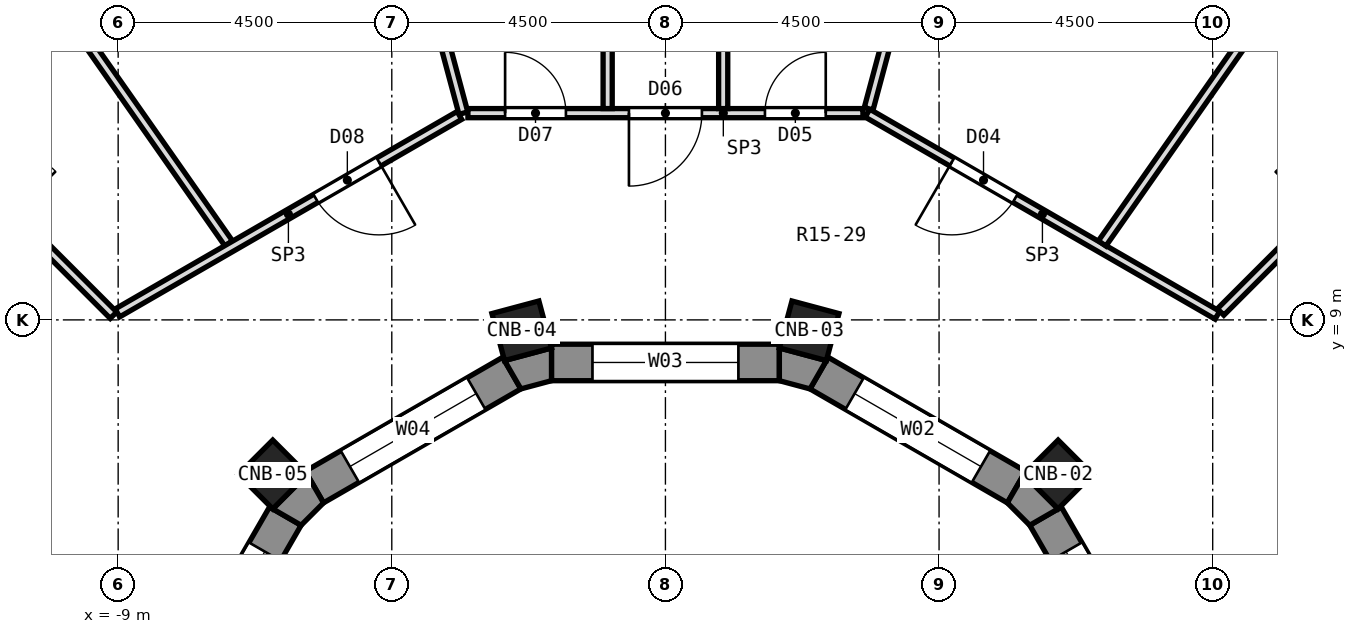
"""IFC4 building model, lengths in metres.
Left out: names, types, materials, properties, quantities, classifications, styles, units other than length and angle.
Written with IfcOpenShell. Run it as: python <this file> out.ifc"""

import sys

from ifc_helpers import new_model, si_unit, direction, frame, frame_2d, origin, origin_2d, place, context, subcontext, project, spatial, polyline, rectangle, outline, extrude, element, fill, save


model = new_model("IFC4")
c1 = context("Model", 3, precision=1e-05, world=origin(), true_north=direction((0.0, 1.0)))
c2 = subcontext(c1, "Body", "Model", "MODEL_VIEW")
j1 = project(units=[si_unit("LENGTHUNIT", "METRE"), si_unit("PLANEANGLEUNIT", "RADIAN")], contexts=[c1])
p1 = place(None, origin())
s1 = spatial("IfcSite", under=j1, at=p1, CompositionType="ELEMENT")
p2 = place(p1, origin())
s2 = spatial("IfcBuilding", under=s1, at=p2, CompositionType="ELEMENT")
p3 = place(p2, frame((0.0, 0.0, 82.4)))
s3 = spatial("IfcBuildingStorey", under=s2, at=p3, CompositionType="ELEMENT", Elevation=82.4)
for number, where, z_axis, x_axis in (
    (1, (6.458, 6.458, 0.0), (0.0, 0.0, 1.0), (0.707, 0.707, 0.0)),
    (2, (2.364, 8.821, 0.0), (0.0, 0.0, 1.0), (0.259, 0.966, 0.0)),
    (3, (-2.364, 8.821, 0.0), (0.0, 0.0, 1.0), (-0.259, 0.966, 0.0)),
    (4, (-6.458, 6.458, 0.0), (0.0, 0.0, 1.0), (-0.707, 0.707, 0.0)),
):
    element("IfcColumn", number, at=place(p3, frame(where, z_axis=z_axis, x_axis=x_axis)), inside=s3, PredefinedType="COLUMN", context=c2, shape_type="SweptSolid", body=[
        extrude(rectangle(XDim=0.8, YDim=0.8, at=origin_2d()), origin(), (0.0, 0.0, 1.0), 4.5),
    ])
p4 = place(p3, frame((8.125, 2.527, 0.0), z_axis=(0.0, 0.0, 1.0), x_axis=(-0.499964958637, 0.86604563398, 0.0)))
e5 = element("IfcWall", 5, at=p4, inside=s3, PredefinedType="SOLIDWALL", context=c2, shape_type="SweptSolid", body=[
    extrude(rectangle(XDim=3.747, YDim=0.6, at=frame_2d((1.874, 0.0))), origin(), (0.0, 0.0, 1.0), 3.95),
])
p5 = place(p4, frame((0.674, 0.0, 1.5)))
e6 = element("IfcOpeningElement", 6, at=p5, cuts=e5, PredefinedType="OPENING", context=c2, shape_type="SweptSolid", body=[
    extrude(rectangle(XDim=2.4, YDim=2.0, at=frame_2d((1.2, 1.0))), frame((0.0, 0.312, 0.0), z_axis=(0.0, -1.0, 0.0), x_axis=(1.0, 0.0, 0.0)), (0.0, 0.0, 1.0), 0.624),
])
p6 = place(p3, frame((5.773, 6.251, 0.0), z_axis=(0.0, 0.0, 1.0), x_axis=(-0.86604563398, 0.499964958637, 0.0)))
e7 = element("IfcWall", 7, at=p6, inside=s3, PredefinedType="SOLIDWALL", context=c2, shape_type="SweptSolid", body=[
    extrude(rectangle(XDim=3.747, YDim=0.6, at=frame_2d((1.874, 0.0))), origin(), (0.0, 0.0, 1.0), 3.95),
])
p7 = place(p6, frame((0.674, 0.0, 1.5)))
e8 = element("IfcOpeningElement", 8, at=p7, cuts=e7, PredefinedType="OPENING", context=c2, shape_type="SweptSolid", body=[
    extrude(rectangle(XDim=2.4, YDim=2.0, at=frame_2d((1.2, 1.0))), frame((0.0, 0.312, 0.0), z_axis=(0.0, -1.0, 0.0), x_axis=(1.0, 0.0, 0.0)), (0.0, 0.0, 1.0), 0.624),
])
p8 = place(p3, frame((1.874, 8.3, 0.0), z_axis=(0.0, 0.0, 1.0), x_axis=(-1.0, 0.0, 0.0)))
e9 = element("IfcWall", 9, at=p8, inside=s3, PredefinedType="SOLIDWALL", context=c2, shape_type="SweptSolid", body=[
    extrude(rectangle(XDim=3.748, YDim=0.6, at=frame_2d((1.874, 0.0))), origin(), (0.0, 0.0, 1.0), 3.95),
])
p9 = place(p8, frame((0.674, 0.0, 1.5)))
e10 = element("IfcOpeningElement", 10, at=p9, cuts=e9, PredefinedType="OPENING", context=c2, shape_type="SweptSolid", body=[
    extrude(rectangle(XDim=2.4, YDim=2.0, at=frame_2d((1.2, 1.0))), frame((0.0, 0.312, 0.0), z_axis=(0.0, -1.0, 0.0), x_axis=(1.0, 0.0, 0.0)), (0.0, 0.0, 1.0), 0.624),
])
p10 = place(p3, frame((-2.527, 8.125, 0.0), z_axis=(0.0, 0.0, 1.0), x_axis=(-0.86604563398, -0.499964958637, 0.0)))
e11 = element("IfcWall", 11, at=p10, inside=s3, PredefinedType="SOLIDWALL", context=c2, shape_type="SweptSolid", body=[
    extrude(rectangle(XDim=3.747, YDim=0.6, at=frame_2d((1.874, 0.0))), origin(), (0.0, 0.0, 1.0), 3.95),
])
p11 = place(p10, frame((0.674, 0.0, 1.5)))
e12 = element("IfcOpeningElement", 12, at=p11, cuts=e11, PredefinedType="OPENING", context=c2, shape_type="SweptSolid", body=[
    extrude(rectangle(XDim=2.4, YDim=2.0, at=frame_2d((1.2, 1.0))), frame((0.0, 0.312, 0.0), z_axis=(0.0, -1.0, 0.0), x_axis=(1.0, 0.0, 0.0)), (0.0, 0.0, 1.0), 0.624),
])
p12 = place(p3, frame((-6.251, 5.773, 0.0), z_axis=(0.0, 0.0, 1.0), x_axis=(-0.499964958637, -0.86604563398, 0.0)))
e13 = element("IfcWall", 13, at=p12, inside=s3, PredefinedType="SOLIDWALL", context=c2, shape_type="SweptSolid", body=[
    extrude(rectangle(XDim=3.747, YDim=0.6, at=frame_2d((1.874, 0.0))), origin(), (0.0, 0.0, 1.0), 3.95),
])
p13 = place(p12, frame((0.674, 0.0, 1.5)))
e14 = element("IfcOpeningElement", 14, at=p13, cuts=e13, PredefinedType="OPENING", context=c2, shape_type="SweptSolid", body=[
    extrude(rectangle(XDim=2.4, YDim=2.0, at=frame_2d((1.2, 1.0))), frame((0.0, 0.312, 0.0), z_axis=(0.0, -1.0, 0.0), x_axis=(1.0, 0.0, 0.0)), (0.0, 0.0, 1.0), 0.624),
])
p14 = place(p3, origin())
e15 = element("IfcWall", 15, at=p14, inside=s3, PredefinedType="SOLIDWALL", context=c2, shape_type="SweptSolid", body=[
    extrude(outline(polyline([(5.892, 6.458), (5.623, 5.991), (5.991, 5.623), (6.458, 5.892), (5.892, 6.458)])), origin(), (0.0, 0.0, 1.0), 3.95),
])
p15 = place(p3, origin())
e16 = element("IfcWall", 16, at=p15, inside=s3, PredefinedType="SOLIDWALL", context=c2, shape_type="SweptSolid", body=[
    extrude(outline(polyline([(1.874, 8.538), (1.874, 8.0), (2.377, 7.865), (2.646, 8.331), (1.874, 8.538)])), origin(), (0.0, 0.0, 1.0), 3.95),
])
p16 = place(p3, origin())
e17 = element("IfcWall", 17, at=p16, inside=s3, PredefinedType="SOLIDWALL", context=c2, shape_type="SweptSolid", body=[
    extrude(outline(polyline([(-2.646, 8.331), (-2.377, 7.865), (-1.874, 8.0), (-1.874, 8.538), (-2.646, 8.331)])), origin(), (0.0, 0.0, 1.0), 3.95),
])
p17 = place(p3, origin())
e18 = element("IfcWall", 18, at=p17, inside=s3, PredefinedType="SOLIDWALL", context=c2, shape_type="SweptSolid", body=[
    extrude(outline(polyline([(-6.458, 5.892), (-5.991, 5.623), (-5.623, 5.991), (-5.892, 6.458), (-6.458, 5.892)])), origin(), (0.0, 0.0, 1.0), 3.95),
])
p18 = place(p3, frame((-6.652, 24.824, 0.0), z_axis=(0.0, 0.0, 1.0), x_axis=(0.258824952043, -0.96592424351, 0.0)))
e19 = element("IfcWall", 19, at=p18, inside=s3, PredefinedType="PARTITIONING", context=c2, shape_type="SweptSolid", body=[
    extrude(rectangle(XDim=12.862, YDim=0.15, at=frame_2d((6.431, 0.0))), origin(), (0.0, 0.0, 1.0), 3.95),
])
p19 = place(p3, frame((-14.741, 21.052, 0.0), z_axis=(0.0, 0.0, 1.0), x_axis=(0.573601596314, -0.819134426518, 0.0)))
e20 = element("IfcWall", 20, at=p19, inside=s3, PredefinedType="PARTITIONING", context=c2, shape_type="SweptSolid", body=[
    extrude(rectangle(XDim=13.178, YDim=0.15, at=frame_2d((6.589, 0.0))), origin(), (0.0, 0.0, 1.0), 3.95),
])
p20 = place(p3, frame((-13.1, 13.1, 0.0), z_axis=(0.0, 0.0, 1.0), x_axis=(0.707106781187, -0.707106781187, 0.0)))
e21 = element("IfcWall", 21, at=p20, inside=s3, PredefinedType="PARTITIONING", context=c2, shape_type="SweptSolid", body=[
    extrude(rectangle(XDim=5.69, YDim=0.15, at=frame_2d((2.845, 0.0))), origin(), (0.0, 0.0, 1.0), 3.95),
])
p21 = place(p20, frame((2.345, 0.0, 0.0)))
e22 = element("IfcOpeningElement", 22, at=p21, cuts=e21, PredefinedType="OPENING", context=c2, shape_type="SweptSolid", body=[
    extrude(rectangle(XDim=1.0, YDim=2.1, at=frame_2d((0.5, 1.05))), frame((0.0, 0.087, 0.0), z_axis=(0.0, -1.0, 0.0), x_axis=(1.0, 0.0, 0.0)), (0.0, 0.0, 1.0), 0.174),
])
p22 = place(p3, frame((3.323, 12.4, 0.0), z_axis=(0.0, 0.0, 1.0), x_axis=(0.865961614908, -0.500110469302, 0.0)))
e23 = element("IfcWall", 23, at=p22, inside=s3, PredefinedType="PARTITIONING", context=c2, shape_type="SweptSolid", body=[
    extrude(rectangle(XDim=6.645, YDim=0.15, at=frame_2d((3.322, 0.0))), origin(), (0.0, 0.0, 1.0), 3.95),
])
p23 = place(p22, frame((1.604, 0.0, 0.0)))
e24 = element("IfcOpeningElement", 24, at=p23, cuts=e23, PredefinedType="OPENING", context=c2, shape_type="SweptSolid", body=[
    extrude(rectangle(XDim=1.2, YDim=2.1, at=frame_2d((0.6, 1.05))), frame((0.0, 0.087, 0.0), z_axis=(0.0, -1.0, 0.0), x_axis=(1.0, 0.0, 0.0)), (0.0, 0.0, 1.0), 0.174),
])
p24 = place(p3, frame((-3.248, 12.4, 0.0), z_axis=(0.0, 0.0, 1.0), x_axis=(1.0, 0.0, 0.0)))
e25 = element("IfcWall", 25, at=p24, inside=s3, PredefinedType="PARTITIONING", context=c2, shape_type="SweptSolid", body=[
    extrude(rectangle(XDim=6.496, YDim=0.15, at=frame_2d((3.248, 0.0))), origin(), (0.0, 0.0, 1.0), 3.95),
])
p25 = place(p24, frame((4.885, 0.0, 0.0)))
e26 = element("IfcOpeningElement", 26, at=p25, cuts=e25, PredefinedType="OPENING", context=c2, shape_type="SweptSolid", body=[
    extrude(rectangle(XDim=1.0, YDim=2.1, at=frame_2d((0.5, 1.05))), frame((0.0, 0.087, 0.0), z_axis=(0.0, -1.0, 0.0), x_axis=(1.0, 0.0, 0.0)), (0.0, 0.0, 1.0), 0.174),
])
p26 = place(p24, frame((2.648, 0.0, 0.0)))
e27 = element("IfcOpeningElement", 27, at=p26, cuts=e25, PredefinedType="OPENING", context=c2, shape_type="SweptSolid", body=[
    extrude(rectangle(XDim=1.2, YDim=2.1, at=frame_2d((0.6, 1.05))), frame((0.0, 0.087, 0.0), z_axis=(0.0, -1.0, 0.0), x_axis=(1.0, 0.0, 0.0)), (0.0, 0.0, 1.0), 0.174),
])
p27 = place(p24, frame((0.612, 0.0, 0.0)))
e28 = element("IfcOpeningElement", 28, at=p27, cuts=e25, PredefinedType="OPENING", context=c2, shape_type="SweptSolid", body=[
    extrude(rectangle(XDim=1.0, YDim=2.1, at=frame_2d((0.5, 1.05))), frame((0.0, 0.087, 0.0), z_axis=(0.0, -1.0, 0.0), x_axis=(1.0, 0.0, 0.0)), (0.0, 0.0, 1.0), 0.174),
])
p28 = place(p3, frame((-9.012, 9.115, 0.0), z_axis=(0.0, 0.0, 1.0), x_axis=(0.865967095912, 0.5001009786, 0.0)))
e29 = element("IfcWall", 29, at=p28, inside=s3, PredefinedType="PARTITIONING", context=c2, shape_type="SweptSolid", body=[
    extrude(rectangle(XDim=6.495, YDim=0.15, at=frame_2d((3.248, 0.0))), origin(), (0.0, 0.0, 1.0), 3.95),
])
p29 = place(p28, frame((3.766, 0.0, 0.0)))
e30 = element("IfcOpeningElement", 30, at=p29, cuts=e29, PredefinedType="OPENING", context=c2, shape_type="SweptSolid", body=[
    extrude(rectangle(XDim=1.2, YDim=2.1, at=frame_2d((0.6, 1.05))), frame((0.0, 0.087, 0.0), z_axis=(0.0, -1.0, 0.0), x_axis=(1.0, 0.0, 0.0)), (0.0, 0.0, 1.0), 0.174),
])
p30 = place(p3, frame((9.13, 9.13, 0.0), z_axis=(0.0, 0.0, 1.0), x_axis=(0.707106781187, 0.707106781187, 0.0)))
e31 = element("IfcWall", 31, at=p30, inside=s3, PredefinedType="PARTITIONING", context=c2, shape_type="SweptSolid", body=[
    extrude(rectangle(XDim=5.575, YDim=0.15, at=frame_2d((2.787, 0.0))), origin(), (0.0, 0.0, 1.0), 3.95),
])
p31 = place(p30, frame((2.27, 0.0, 0.0)))
e32 = element("IfcOpeningElement", 32, at=p31, cuts=e31, PredefinedType="OPENING", context=c2, shape_type="SweptSolid", body=[
    extrude(rectangle(XDim=1.0, YDim=2.1, at=frame_2d((0.5, 1.05))), frame((0.0, 0.087, 0.0), z_axis=(0.0, -1.0, 0.0), x_axis=(1.0, 0.0, 0.0)), (0.0, 0.0, 1.0), 0.174),
])
p32 = place(p3, frame((7.182, 10.258, 0.0), z_axis=(0.0, 0.0, 1.0), x_axis=(0.573601596314, 0.819134426518, 0.0)))
e33 = element("IfcWall", 33, at=p32, inside=s3, PredefinedType="PARTITIONING", context=c2, shape_type="SweptSolid", body=[
    extrude(rectangle(XDim=13.178, YDim=0.15, at=frame_2d((6.589, 0.0))), origin(), (0.0, 0.0, 1.0), 3.95),
])
p33 = place(p3, frame((3.342, 12.472, 0.0), z_axis=(0.0, 0.0, 1.0), x_axis=(0.258835334672, 0.965921461365, 0.0)))
e34 = element("IfcWall", 34, at=p33, inside=s3, PredefinedType="PARTITIONING", context=c2, shape_type="SweptSolid", body=[
    extrude(rectangle(XDim=12.787, YDim=0.15, at=frame_2d((6.394, 0.0))), origin(), (0.0, 0.0, 1.0), 3.95),
])
for number, where, z_axis, x_axis in (
    (35, (0.95, 12.475, 0.0), (0.0, 0.0, 1.0), (0.0, 1.0, 0.0)),
    (36, (-0.95, 12.475, 0.0), (0.0, 0.0, 1.0), (0.0, 1.0, 0.0)),
):
    element("IfcWall", number, at=place(p3, frame(where, z_axis=z_axis, x_axis=x_axis)), inside=s3, PredefinedType="PARTITIONING", context=c2, shape_type="SweptSolid", body=[
        extrude(rectangle(XDim=6.747, YDim=0.15, at=frame_2d((3.374, 0.0))), origin(), (0.0, 0.0, 1.0), 3.95),
    ])
p34 = place(p5, origin())
e37 = element("IfcWindow", 37, at=p34, inside=s3, PartitioningType="SINGLE_PANEL", PredefinedType="WINDOW", context=c2, shape_type="SweptSolid", body=[
    extrude(rectangle(XDim=2.4, YDim=2.0, at=frame_2d((1.2, 1.0))), frame((0.0, -0.12, 0.0), z_axis=(0.0, -1.0, 0.0), x_axis=(1.0, 0.0, 0.0)), (0.0, 0.0, 1.0), 0.06),
])
fill(e6, e37)
p35 = place(p7, origin())
e38 = element("IfcWindow", 38, at=p35, inside=s3, PartitioningType="SINGLE_PANEL", PredefinedType="WINDOW", context=c2, shape_type="SweptSolid", body=[
    extrude(rectangle(XDim=2.4, YDim=2.0, at=frame_2d((1.2, 1.0))), frame((0.0, -0.12, 0.0), z_axis=(0.0, -1.0, 0.0), x_axis=(1.0, 0.0, 0.0)), (0.0, 0.0, 1.0), 0.06),
])
fill(e8, e38)
p36 = place(p9, origin())
e39 = element("IfcWindow", 39, at=p36, inside=s3, PartitioningType="SINGLE_PANEL", PredefinedType="WINDOW", context=c2, shape_type="SweptSolid", body=[
    extrude(rectangle(XDim=2.4, YDim=2.0, at=frame_2d((1.2, 1.0))), frame((0.0, -0.12, 0.0), z_axis=(0.0, -1.0, 0.0), x_axis=(1.0, 0.0, 0.0)), (0.0, 0.0, 1.0), 0.06),
])
fill(e10, e39)
p37 = place(p11, origin())
e40 = element("IfcWindow", 40, at=p37, inside=s3, PartitioningType="SINGLE_PANEL", PredefinedType="WINDOW", context=c2, shape_type="SweptSolid", body=[
    extrude(rectangle(XDim=2.4, YDim=2.0, at=frame_2d((1.2, 1.0))), frame((0.0, -0.12, 0.0), z_axis=(0.0, -1.0, 0.0), x_axis=(1.0, 0.0, 0.0)), (0.0, 0.0, 1.0), 0.06),
])
fill(e12, e40)
p38 = place(p13, origin())
e41 = element("IfcWindow", 41, at=p38, inside=s3, PartitioningType="SINGLE_PANEL", PredefinedType="WINDOW", context=c2, shape_type="SweptSolid", body=[
    extrude(rectangle(XDim=2.4, YDim=2.0, at=frame_2d((1.2, 1.0))), frame((0.0, -0.12, 0.0), z_axis=(0.0, -1.0, 0.0), x_axis=(1.0, 0.0, 0.0)), (0.0, 0.0, 1.0), 0.06),
])
fill(e14, e41)
p39 = place(p23, frame((1.2, 0.0, 0.0), z_axis=(0.0, 0.0, 1.0), x_axis=(-1.0, 0.0, 0.0)))
e42 = element("IfcDoor", 42, at=p39, inside=s3, OperationType="SINGLE_SWING_RIGHT", PredefinedType="DOOR", context=c2, shape_type="SweptSolid", body=[
    extrude(rectangle(XDim=1.2, YDim=2.1, at=frame_2d((0.6, 1.05))), frame((0.0, 0.025, 0.0), z_axis=(0.0, -1.0, 0.0), x_axis=(1.0, 0.0, 0.0)), (0.0, 0.0, 1.0), 0.05),
])
fill(e24, e42)
p40 = place(p25, origin())
e43 = element("IfcDoor", 43, at=p40, inside=s3, OperationType="SINGLE_SWING_RIGHT", PredefinedType="DOOR", context=c2, shape_type="SweptSolid", body=[
    extrude(rectangle(XDim=1.0, YDim=2.1, at=frame_2d((0.5, 1.05))), frame((0.0, 0.025, 0.0), z_axis=(0.0, -1.0, 0.0), x_axis=(1.0, 0.0, 0.0)), (0.0, 0.0, 1.0), 0.05),
])
fill(e26, e43)
p41 = place(p26, frame((1.2, 0.0, 0.0), z_axis=(0.0, 0.0, 1.0), x_axis=(-1.0, 0.0, 0.0)))
e44 = element("IfcDoor", 44, at=p41, inside=s3, OperationType="SINGLE_SWING_RIGHT", PredefinedType="DOOR", context=c2, shape_type="SweptSolid", body=[
    extrude(rectangle(XDim=1.2, YDim=2.1, at=frame_2d((0.6, 1.05))), frame((0.0, 0.025, 0.0), z_axis=(0.0, -1.0, 0.0), x_axis=(1.0, 0.0, 0.0)), (0.0, 0.0, 1.0), 0.05),
])
fill(e27, e44)
p42 = place(p27, origin())
e45 = element("IfcDoor", 45, at=p42, inside=s3, OperationType="SINGLE_SWING_LEFT", PredefinedType="DOOR", context=c2, shape_type="SweptSolid", body=[
    extrude(rectangle(XDim=1.0, YDim=2.1, at=frame_2d((0.5, 1.05))), frame((0.0, 0.025, 0.0), z_axis=(0.0, -1.0, 0.0), x_axis=(1.0, 0.0, 0.0)), (0.0, 0.0, 1.0), 0.05),
])
fill(e28, e45)
p43 = place(p29, frame((1.2, 0.0, 0.0), z_axis=(0.0, 0.0, 1.0), x_axis=(-1.0, 0.0, 0.0)))
e46 = element("IfcDoor", 46, at=p43, inside=s3, OperationType="SINGLE_SWING_LEFT", PredefinedType="DOOR", context=c2, shape_type="SweptSolid", body=[
    extrude(rectangle(XDim=1.2, YDim=2.1, at=frame_2d((0.6, 1.05))), frame((0.0, 0.025, 0.0), z_axis=(0.0, -1.0, 0.0), x_axis=(1.0, 0.0, 0.0)), (0.0, 0.0, 1.0), 0.05),
])
fill(e30, e46)
save(model, sys.argv[1])
